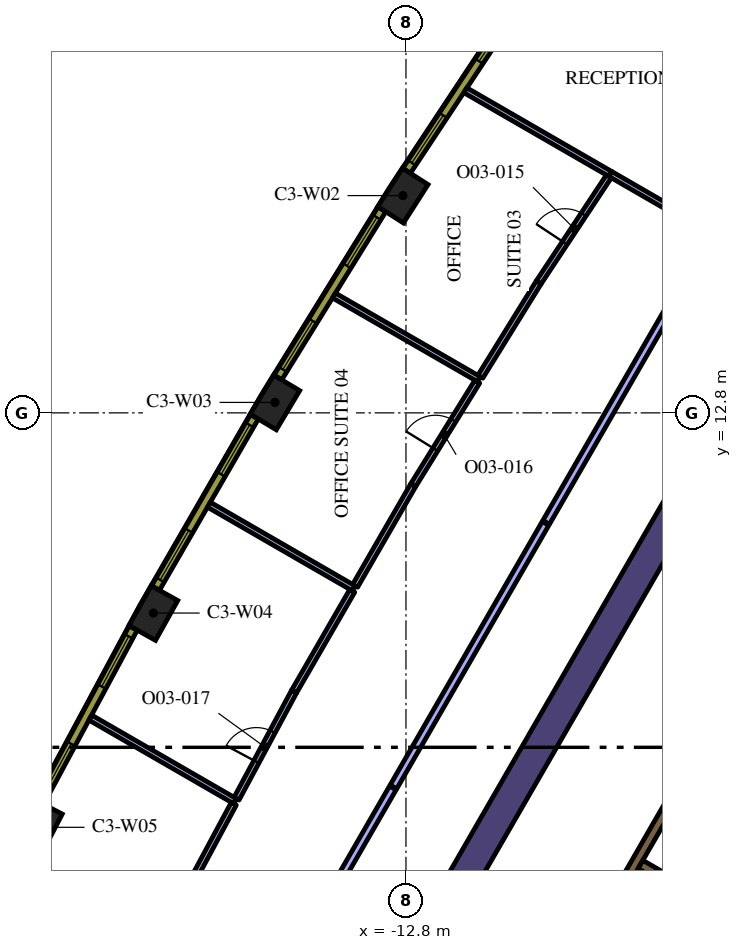
"""IFC4 building model, lengths in metres.
Left out: names, types, materials, properties, quantities, classifications, styles, units other than length and angle.
Written with IfcOpenShell. Run it as: python <this file> out.ifc"""

import sys

from ifc_helpers import new_model, si_unit, direction, frame, frame_2d, origin, origin_2d, place, context, subcontext, project, spatial, rectangle, extrude, element, fill, save


model = new_model("IFC4")
c1 = context("Model", 3, precision=1e-05, world=origin(), true_north=direction((0.0, 1.0)))
c2 = subcontext(c1, "Body", "Model", "MODEL_VIEW")
j1 = project(units=[si_unit("LENGTHUNIT", "METRE"), si_unit("PLANEANGLEUNIT", "RADIAN")], contexts=[c1])
p1 = place(None, origin())
s1 = spatial("IfcSite", under=j1, at=p1, CompositionType="ELEMENT")
p2 = place(p1, origin())
s2 = spatial("IfcBuilding", under=s1, at=p2, CompositionType="ELEMENT")
p3 = place(p2, frame((0.0, 0.0, 166.8)))
s3 = spatial("IfcBuildingStorey", under=s2, at=p3, CompositionType="ELEMENT", Elevation=166.8)
for number, where, z_axis, x_axis in (
    (1, (-12.88, 18.517, 0.0), (0.0, 0.0, 1.0), (-0.539, -0.842, 0.0)),
    (2, (-16.247, 13.075, 0.0), (0.0, 0.0, 1.0), (-0.513, -0.858, 0.0)),
    (3, (-19.447, 7.533, 0.0), (0.0, 0.0, 1.0), (-0.487, -0.874, 0.0)),
    (4, (-22.476, 1.896, 0.0), (0.0, 0.0, 1.0), (-0.46, -0.888, 0.0)),
):
    element("IfcColumn", number, at=place(p3, frame(where, z_axis=z_axis, x_axis=x_axis)), inside=s3, PredefinedType="COLUMN", context=c2, shape_type="SweptSolid", body=[
        extrude(rectangle(XDim=1.2, YDim=0.8, at=origin_2d()), origin(), (0.0, 0.0, 1.0), 4.2),
    ])
p4 = place(p3, frame((-12.668, -1.842, 0.0), z_axis=(0.0, 0.0, 1.0), x_axis=(0.500003640647, 0.866023301845, 0.0)))
e5 = element("IfcWall", 5, at=p4, inside=s3, PredefinedType="SOLIDWALL", context=c2, shape_type="SweptSolid", body=[
    extrude(rectangle(XDim=15.858, YDim=0.8, at=frame_2d((7.929, 0.0))), origin(), (0.0, 0.0, 1.0), 4.2),
])
p5 = place(p3, frame((-8.06, -1.311, 0.0), z_axis=(0.0, 0.0, 1.0), x_axis=(0.50000273126, 0.866023826885, 0.0)))
e6 = element("IfcWall", 6, at=p5, inside=s3, PredefinedType="SOLIDWALL", context=c2, shape_type="SweptSolid", body=[
    extrude(rectangle(XDim=10.33, YDim=0.25, at=frame_2d((5.165, 0.0))), origin(), (0.0, 0.0, 1.0), 4.2),
])
p6 = place(p3, frame((-4.724, -0.182, 0.0), z_axis=(0.0, 0.0, 1.0), x_axis=(-0.866008176907, 0.50002983664, 0.0)))
e7 = element("IfcWall", 7, at=p6, inside=s3, PredefinedType="SOLIDWALL", context=c2, shape_type="SweptSolid", body=[
    extrude(rectangle(XDim=2.2, YDim=0.25, at=frame_2d((1.1, 0.0))), origin(), (0.0, 0.0, 1.0), 4.2),
])
p7 = place(p3, frame((-7.416, 19.083, 0.0), z_axis=(0.0, 0.0, 1.0), x_axis=(-0.866028016946, 0.499995473844, 0.0)))
e8 = element("IfcWall", 8, at=p7, inside=s3, PredefinedType="PARTITIONING", context=c2, shape_type="SweptSolid", body=[
    extrude(rectangle(XDim=4.412, YDim=0.15, at=frame_2d((2.206, 0.0))), origin(), (0.0, 0.0, 1.0), 3.15),
])
p8 = place(p3, frame((-4.719, 17.526, 0.0), z_axis=(0.0, 0.0, 1.0), x_axis=(-0.866011075544, 0.500024816419, 0.0)))
e9 = element("IfcWall", 9, at=p8, inside=s3, PredefinedType="PARTITIONING", context=c2, shape_type="SweptSolid", body=[
    extrude(rectangle(XDim=3.122, YDim=0.15, at=frame_2d((1.561, 0.0))), origin(), (0.0, 0.0, 1.0), 3.15),
])
p9 = place(p3, frame((-10.883, 13.687, 0.0), z_axis=(0.0, 0.0, 1.0), x_axis=(-0.866033195618, 0.499986503906, 0.0)))
e10 = element("IfcWall", 10, at=p9, inside=s3, PredefinedType="PARTITIONING", context=c2, shape_type="SweptSolid", body=[
    extrude(rectangle(XDim=4.402, YDim=0.15, at=frame_2d((2.201, 0.0))), origin(), (0.0, 0.0, 1.0), 3.15),
])
p10 = place(p3, frame((-9.308, 16.231, 0.0), z_axis=(0.0, 0.0, 1.0), x_axis=(0.551902709159, 0.833908507945, 0.0)))
e11 = element("IfcWall", 11, at=p10, inside=s3, PredefinedType="PARTITIONING", context=c2, shape_type="SweptSolid", body=[
    extrude(rectangle(XDim=3.347, YDim=0.15, at=frame_2d((1.673, 0.0))), origin(), (0.0, 0.0, 1.0), 3.15),
])
p11 = place(p10, frame((1.247, 0.0, 0.0)))
e12 = element("IfcOpeningElement", 12, at=p11, cuts=e11, PredefinedType="OPENING", context=c2, shape_type="SweptSolid", body=[
    extrude(rectangle(XDim=0.9, YDim=2.1, at=frame_2d((0.45, 1.05))), frame((0.0, 0.085, 0.0), z_axis=(0.0, -1.0, 0.0), x_axis=(1.0, 0.0, 0.0)), (0.0, 0.0, 1.0), 0.17),
])
p12 = place(p3, frame((-9.308, 16.231, 0.0), z_axis=(0.0, 0.0, 1.0), x_axis=(-0.526201893736, -0.850359669216, 0.0)))
e13 = element("IfcWall", 13, at=p12, inside=s3, PredefinedType="PARTITIONING", context=c2, shape_type="SweptSolid", body=[
    extrude(rectangle(XDim=2.917, YDim=0.15, at=frame_2d((1.458, 0.0))), origin(), (0.0, 0.0, 1.0), 3.15),
])
p13 = place(p3, frame((-14.175, 8.184, 0.0), z_axis=(0.0, 0.0, 1.0), x_axis=(-0.866032203192, 0.499988222896, 0.0)))
e14 = element("IfcWall", 14, at=p13, inside=s3, PredefinedType="PARTITIONING", context=c2, shape_type="SweptSolid", body=[
    extrude(rectangle(XDim=4.4, YDim=0.15, at=frame_2d((2.2, 0.0))), origin(), (0.0, 0.0, 1.0), 3.15),
])
p14 = place(p3, frame((-12.608, 10.899, 0.0), z_axis=(0.0, 0.0, 1.0), x_axis=(0.526170942761, 0.850378820876, 0.0)))
e15 = element("IfcWall", 15, at=p14, inside=s3, PredefinedType="PARTITIONING", context=c2, shape_type="SweptSolid", body=[
    extrude(rectangle(XDim=3.203, YDim=0.15, at=frame_2d((1.602, 0.0))), origin(), (0.0, 0.0, 1.0), 3.15),
])
p15 = place(p14, frame((1.103, 0.0, 0.0)))
e16 = element("IfcOpeningElement", 16, at=p15, cuts=e15, PredefinedType="OPENING", context=c2, shape_type="SweptSolid", body=[
    extrude(rectangle(XDim=0.9, YDim=2.1, at=frame_2d((0.45, 1.05))), frame((0.0, 0.085, 0.0), z_axis=(0.0, -1.0, 0.0), x_axis=(1.0, 0.0, 0.0)), (0.0, 0.0, 1.0), 0.17),
])
p16 = place(p3, frame((-12.608, 10.899, 0.0), z_axis=(0.0, 0.0, 1.0), x_axis=(-0.499991792115, -0.866030142557, 0.0)))
e17 = element("IfcWall", 17, at=p16, inside=s3, PredefinedType="PARTITIONING", context=c2, shape_type="SweptSolid", body=[
    extrude(rectangle(XDim=3.06, YDim=0.15, at=frame_2d((1.53, 0.0))), origin(), (0.0, 0.0, 1.0), 3.15),
])
p17 = place(p3, frame((-17.295, 2.581, 0.0), z_axis=(0.0, 0.0, 1.0), x_axis=(-0.866033195618, 0.499986503906, 0.0)))
e18 = element("IfcWall", 18, at=p17, inside=s3, PredefinedType="PARTITIONING", context=c2, shape_type="SweptSolid", body=[
    extrude(rectangle(XDim=4.402, YDim=0.15, at=frame_2d((2.201, 0.0))), origin(), (0.0, 0.0, 1.0), 3.15),
])
p18 = place(p3, frame((-14.213, 8.119, 0.0), z_axis=(0.0, 0.0, 1.0), x_axis=(-0.499991792115, -0.866030142557, 0.0)))
e19 = element("IfcWall", 19, at=p18, inside=s3, PredefinedType="PARTITIONING", context=c2, shape_type="SweptSolid", body=[
    extrude(rectangle(XDim=3.06, YDim=0.15, at=frame_2d((1.53, 0.0))), origin(), (0.0, 0.0, 1.0), 3.15),
])
p19 = place(p3, frame((-17.259, 2.647, 0.0), z_axis=(0.0, 0.0, 1.0), x_axis=(0.473299711777, 0.880901460341, 0.0)))
e20 = element("IfcWall", 20, at=p19, inside=s3, PredefinedType="PARTITIONING", context=c2, shape_type="SweptSolid", body=[
    extrude(rectangle(XDim=3.203, YDim=0.15, at=frame_2d((1.602, 0.0))), origin(), (0.0, 0.0, 1.0), 3.15),
])
p20 = place(p19, frame((1.104, 0.0, 0.0)))
e21 = element("IfcOpeningElement", 21, at=p20, cuts=e20, PredefinedType="OPENING", context=c2, shape_type="SweptSolid", body=[
    extrude(rectangle(XDim=0.9, YDim=2.1, at=frame_2d((0.45, 1.05))), frame((0.0, 0.085, 0.0), z_axis=(0.0, -1.0, 0.0), x_axis=(1.0, 0.0, 0.0)), (0.0, 0.0, 1.0), 0.17),
])
p21 = place(p3, frame((-17.33, 2.515, 0.0), z_axis=(0.0, 0.0, 1.0), x_axis=(-0.473335958085, -0.880881984595, 0.0)))
e22 = element("IfcWall", 22, at=p21, inside=s3, PredefinedType="PARTITIONING", context=c2, shape_type="SweptSolid", body=[
    extrude(rectangle(XDim=2.917, YDim=0.15, at=frame_2d((1.458, 0.0))), origin(), (0.0, 0.0, 1.0), 3.15),
])
p22 = place(p3, frame((-9.126, 9.893, 0.0), z_axis=(0.0, 0.0, 1.0), x_axis=(-0.499995158272, -0.866028199139, 0.0)))
e23 = element("IfcWall", 23, at=p22, inside=s3, PredefinedType="PARTITIONING", context=c2, shape_type="SweptSolid", body=[
    extrude(rectangle(XDim=8.008, YDim=0.2, at=frame_2d((4.004, 0.0))), origin(), (0.0, 0.0, 1.0), 3.15),
])
p23 = place(p3, frame((-13.146, 2.931, 0.0), z_axis=(0.0, 0.0, 1.0), x_axis=(-0.499997861235, -0.866026638597, 0.0)))
e24 = element("IfcWall", 24, at=p23, inside=s3, PredefinedType="PARTITIONING", context=c2, shape_type="SweptSolid", body=[
    extrude(rectangle(XDim=10.717, YDim=0.2, at=frame_2d((5.359, 0.0))), origin(), (0.0, 0.0, 1.0), 3.15),
])
p24 = place(p23, frame((4.9, 0.0, 0.0)))
e25 = element("IfcOpeningElement", 25, at=p24, cuts=e24, PredefinedType="OPENING", context=c2, shape_type="SweptSolid", body=[
    extrude(rectangle(XDim=1.0, YDim=2.1, at=frame_2d((0.5, 1.05))), frame((0.0, 0.11, 0.0), z_axis=(0.0, -1.0, 0.0), x_axis=(1.0, 0.0, 0.0)), (0.0, 0.0, 1.0), 0.22),
])
p25 = place(p3, frame((-4.757, 17.461, 0.0), z_axis=(0.0, 0.0, 1.0), x_axis=(-0.499998278779, -0.866026397529, 0.0)))
e26 = element("IfcWall", 26, at=p25, inside=s3, PredefinedType="PARTITIONING", context=c2, shape_type="SweptSolid", body=[
    extrude(rectangle(XDim=8.709, YDim=0.2, at=frame_2d((4.354, 0.0))), origin(), (0.0, 0.0, 1.0), 3.15),
])
p26 = place(p3, frame((-9.911, 23.51, 0.0), z_axis=(0.0, 0.0, 1.0), x_axis=(-0.551892811511, -0.833915058386, 0.0)))
e27 = element("IfcWall", 27, at=p26, inside=s3, PredefinedType="SOLIDWALL", context=c2, shape_type="SweptSolid", body=[
    extrude(rectangle(XDim=5.204, YDim=0.24, at=frame_2d((2.602, 0.0))), origin(), (0.0, 0.0, 1.0), 3.95),
])
p27 = place(p26, frame((0.248, 0.0, 0.9)))
e28 = element("IfcOpeningElement", 28, at=p27, cuts=e27, PredefinedType="OPENING", context=c2, shape_type="SweptSolid", body=[
    extrude(rectangle(XDim=1.5, YDim=2.55, at=frame_2d((0.75, 1.275))), frame((0.0, 0.13, 0.0), z_axis=(0.0, -1.0, 0.0), x_axis=(1.0, 0.0, 0.0)), (0.0, 0.0, 1.0), 0.26),
])
p28 = place(p26, frame((3.455, 0.0, 0.9)))
e29 = element("IfcOpeningElement", 29, at=p28, cuts=e27, PredefinedType="OPENING", context=c2, shape_type="SweptSolid", body=[
    extrude(rectangle(XDim=1.5, YDim=2.55, at=frame_2d((0.75, 1.275))), frame((0.0, 0.13, 0.0), z_axis=(0.0, -1.0, 0.0), x_axis=(1.0, 0.0, 0.0)), (0.0, 0.0, 1.0), 0.26),
])
p29 = place(p3, frame((-13.433, 18.156, 0.0), z_axis=(0.0, 0.0, 1.0), x_axis=(-0.526197926587, -0.850362124072, 0.0)))
e30 = element("IfcWall", 30, at=p29, inside=s3, PredefinedType="SOLIDWALL", context=c2, shape_type="SweptSolid", body=[
    extrude(rectangle(XDim=5.203, YDim=0.24, at=frame_2d((2.602, 0.0))), origin(), (0.0, 0.0, 1.0), 3.95),
])
p30 = place(p29, frame((0.248, 0.0, 0.9)))
e31 = element("IfcOpeningElement", 31, at=p30, cuts=e30, PredefinedType="OPENING", context=c2, shape_type="SweptSolid", body=[
    extrude(rectangle(XDim=1.5, YDim=2.55, at=frame_2d((0.75, 1.275))), frame((0.0, 0.13, 0.0), z_axis=(0.0, -1.0, 0.0), x_axis=(1.0, 0.0, 0.0)), (0.0, 0.0, 1.0), 0.26),
])
p31 = place(p29, frame((3.455, 0.0, 0.9)))
e32 = element("IfcOpeningElement", 32, at=p31, cuts=e30, PredefinedType="OPENING", context=c2, shape_type="SweptSolid", body=[
    extrude(rectangle(XDim=1.5, YDim=2.55, at=frame_2d((0.75, 1.275))), frame((0.0, 0.13, 0.0), z_axis=(0.0, -1.0, 0.0), x_axis=(1.0, 0.0, 0.0)), (0.0, 0.0, 1.0), 0.26),
])
p32 = place(p3, frame((-16.789, 12.697, 0.0), z_axis=(0.0, 0.0, 1.0), x_axis=(-0.500009456303, -0.866019944116, 0.0)))
e33 = element("IfcWall", 33, at=p32, inside=s3, PredefinedType="SOLIDWALL", context=c2, shape_type="SweptSolid", body=[
    extrude(rectangle(XDim=5.204, YDim=0.24, at=frame_2d((2.602, 0.0))), origin(), (0.0, 0.0, 1.0), 3.95),
])
p33 = place(p32, frame((0.248, 0.0, 0.9)))
e34 = element("IfcOpeningElement", 34, at=p33, cuts=e33, PredefinedType="OPENING", context=c2, shape_type="SweptSolid", body=[
    extrude(rectangle(XDim=1.5, YDim=2.55, at=frame_2d((0.75, 1.275))), frame((0.0, 0.13, 0.0), z_axis=(0.0, -1.0, 0.0), x_axis=(1.0, 0.0, 0.0)), (0.0, 0.0, 1.0), 0.26),
])
p34 = place(p32, frame((3.455, 0.0, 0.9)))
e35 = element("IfcOpeningElement", 35, at=p34, cuts=e33, PredefinedType="OPENING", context=c2, shape_type="SweptSolid", body=[
    extrude(rectangle(XDim=1.5, YDim=2.55, at=frame_2d((0.75, 1.275))), frame((0.0, 0.13, 0.0), z_axis=(0.0, -1.0, 0.0), x_axis=(1.0, 0.0, 0.0)), (0.0, 0.0, 1.0), 0.26),
])
p35 = place(p3, frame((-19.977, 7.139, 0.0), z_axis=(0.0, 0.0, 1.0), x_axis=(-0.473349833294, -0.880874528704, 0.0)))
e36 = element("IfcWall", 36, at=p35, inside=s3, PredefinedType="SOLIDWALL", context=c2, shape_type="SweptSolid", body=[
    extrude(rectangle(XDim=5.204, YDim=0.24, at=frame_2d((2.602, 0.0))), origin(), (0.0, 0.0, 1.0), 3.95),
])
p36 = place(p35, frame((0.248, 0.0, 0.9)))
e37 = element("IfcOpeningElement", 37, at=p36, cuts=e36, PredefinedType="OPENING", context=c2, shape_type="SweptSolid", body=[
    extrude(rectangle(XDim=1.5, YDim=2.55, at=frame_2d((0.75, 1.275))), frame((0.0, 0.13, 0.0), z_axis=(0.0, -1.0, 0.0), x_axis=(1.0, 0.0, 0.0)), (0.0, 0.0, 1.0), 0.26),
])
p37 = place(p35, frame((3.455, 0.0, 0.9)))
e38 = element("IfcOpeningElement", 38, at=p37, cuts=e36, PredefinedType="OPENING", context=c2, shape_type="SweptSolid", body=[
    extrude(rectangle(XDim=1.5, YDim=2.55, at=frame_2d((0.75, 1.275))), frame((0.0, 0.13, 0.0), z_axis=(0.0, -1.0, 0.0), x_axis=(1.0, 0.0, 0.0)), (0.0, 0.0, 1.0), 0.26),
])
p38 = place(p11, origin())
e39 = element("IfcDoor", 39, at=p38, inside=s3, OperationType="SINGLE_SWING_RIGHT", PredefinedType="DOOR", context=c2, shape_type="SweptSolid", body=[
    extrude(rectangle(XDim=0.9, YDim=2.1, at=frame_2d((0.45, 1.05))), frame((0.0, 0.025, 0.0), z_axis=(0.0, -1.0, 0.0), x_axis=(1.0, 0.0, 0.0)), (0.0, 0.0, 1.0), 0.05),
])
fill(e12, e39)
p39 = place(p15, origin())
e40 = element("IfcDoor", 40, at=p39, inside=s3, OperationType="SINGLE_SWING_LEFT", PredefinedType="DOOR", context=c2, shape_type="SweptSolid", body=[
    extrude(rectangle(XDim=0.9, YDim=2.1, at=frame_2d((0.45, 1.05))), frame((0.0, 0.025, 0.0), z_axis=(0.0, -1.0, 0.0), x_axis=(1.0, 0.0, 0.0)), (0.0, 0.0, 1.0), 0.05),
])
fill(e16, e40)
p40 = place(p20, origin())
e41 = element("IfcDoor", 41, at=p40, inside=s3, OperationType="SINGLE_SWING_LEFT", PredefinedType="DOOR", context=c2, shape_type="SweptSolid", body=[
    extrude(rectangle(XDim=0.9, YDim=2.1, at=frame_2d((0.45, 1.05))), frame((0.0, 0.025, 0.0), z_axis=(0.0, -1.0, 0.0), x_axis=(1.0, 0.0, 0.0)), (0.0, 0.0, 1.0), 0.05),
])
fill(e21, e41)
p41 = place(p27, origin())
e42 = element("IfcWindow", 42, at=p41, inside=s3, PartitioningType="SINGLE_PANEL", PredefinedType="WINDOW", context=c2, shape_type="SweptSolid", body=[
    extrude(rectangle(XDim=1.5, YDim=2.55, at=frame_2d((0.75, 1.275))), frame((0.0, 0.04, 0.0), z_axis=(0.0, -1.0, 0.0), x_axis=(1.0, 0.0, 0.0)), (0.0, 0.0, 1.0), 0.06),
])
fill(e28, e42)
p42 = place(p28, origin())
e43 = element("IfcWindow", 43, at=p42, inside=s3, PartitioningType="SINGLE_PANEL", PredefinedType="WINDOW", context=c2, shape_type="SweptSolid", body=[
    extrude(rectangle(XDim=1.5, YDim=2.55, at=frame_2d((0.75, 1.275))), frame((0.0, 0.04, 0.0), z_axis=(0.0, -1.0, 0.0), x_axis=(1.0, 0.0, 0.0)), (0.0, 0.0, 1.0), 0.06),
])
fill(e29, e43)
p43 = place(p30, origin())
e44 = element("IfcWindow", 44, at=p43, inside=s3, PartitioningType="SINGLE_PANEL", PredefinedType="WINDOW", context=c2, shape_type="SweptSolid", body=[
    extrude(rectangle(XDim=1.5, YDim=2.55, at=frame_2d((0.75, 1.275))), frame((0.0, 0.04, 0.0), z_axis=(0.0, -1.0, 0.0), x_axis=(1.0, 0.0, 0.0)), (0.0, 0.0, 1.0), 0.06),
])
fill(e31, e44)
p44 = place(p31, origin())
e45 = element("IfcWindow", 45, at=p44, inside=s3, PartitioningType="SINGLE_PANEL", PredefinedType="WINDOW", context=c2, shape_type="SweptSolid", body=[
    extrude(rectangle(XDim=1.5, YDim=2.55, at=frame_2d((0.75, 1.275))), frame((0.0, 0.04, 0.0), z_axis=(0.0, -1.0, 0.0), x_axis=(1.0, 0.0, 0.0)), (0.0, 0.0, 1.0), 0.06),
])
fill(e32, e45)
p45 = place(p33, origin())
e46 = element("IfcWindow", 46, at=p45, inside=s3, PartitioningType="SINGLE_PANEL", PredefinedType="WINDOW", context=c2, shape_type="SweptSolid", body=[
    extrude(rectangle(XDim=1.5, YDim=2.55, at=frame_2d((0.75, 1.275))), frame((0.0, 0.04, 0.0), z_axis=(0.0, -1.0, 0.0), x_axis=(1.0, 0.0, 0.0)), (0.0, 0.0, 1.0), 0.06),
])
fill(e34, e46)
p46 = place(p34, origin())
e47 = element("IfcWindow", 47, at=p46, inside=s3, PartitioningType="SINGLE_PANEL", PredefinedType="WINDOW", context=c2, shape_type="SweptSolid", body=[
    extrude(rectangle(XDim=1.5, YDim=2.55, at=frame_2d((0.75, 1.275))), frame((0.0, 0.04, 0.0), z_axis=(0.0, -1.0, 0.0), x_axis=(1.0, 0.0, 0.0)), (0.0, 0.0, 1.0), 0.06),
])
fill(e35, e47)
p47 = place(p36, origin())
e48 = element("IfcWindow", 48, at=p47, inside=s3, PartitioningType="SINGLE_PANEL", PredefinedType="WINDOW", context=c2, shape_type="SweptSolid", body=[
    extrude(rectangle(XDim=1.5, YDim=2.55, at=frame_2d((0.75, 1.275))), frame((0.0, 0.04, 0.0), z_axis=(0.0, -1.0, 0.0), x_axis=(1.0, 0.0, 0.0)), (0.0, 0.0, 1.0), 0.06),
])
fill(e37, e48)
p48 = place(p37, origin())
e49 = element("IfcWindow", 49, at=p48, inside=s3, PartitioningType="SINGLE_PANEL", PredefinedType="WINDOW", context=c2, shape_type="SweptSolid", body=[
    extrude(rectangle(XDim=1.5, YDim=2.55, at=frame_2d((0.75, 1.275))), frame((0.0, 0.04, 0.0), z_axis=(0.0, -1.0, 0.0), x_axis=(1.0, 0.0, 0.0)), (0.0, 0.0, 1.0), 0.06),
])
fill(e38, e49)
save(model, sys.argv[1])
